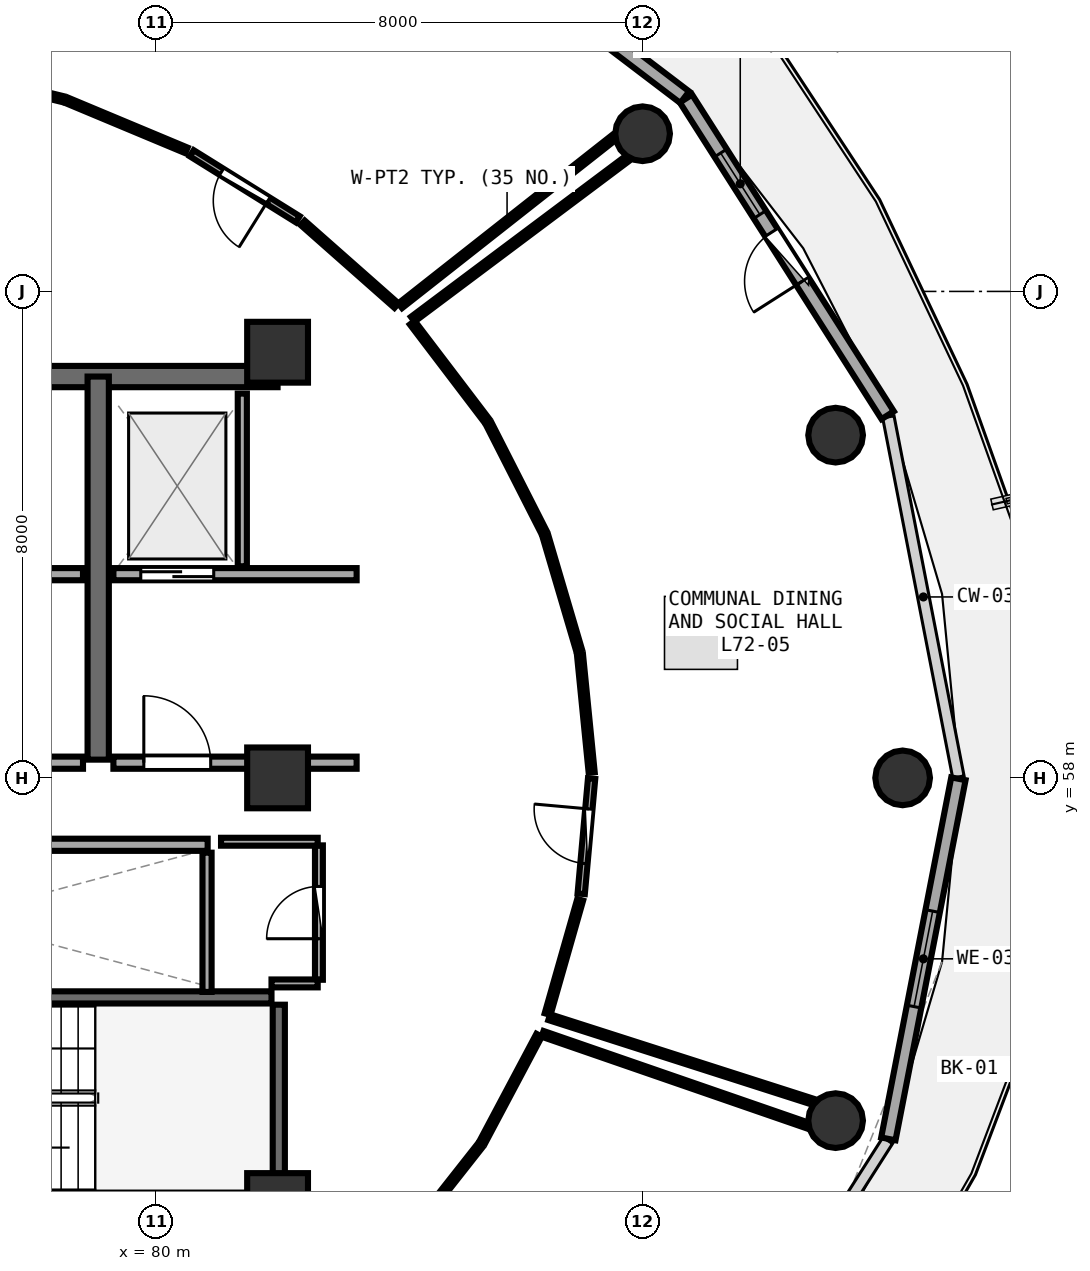
"""IFC4 building model, lengths in metres.
Left out: names, types, materials, properties, quantities, classifications, styles, units other than length and angle.
Written with IfcOpenShell. Run it as: python <this file> out.ifc"""

import sys

from ifc_helpers import new_model, si_unit, direction, frame, frame_2d, origin, origin_2d, place, context, subcontext, project, spatial, rectangle, circle, extrude, element, fill, save


model = new_model("IFC4")
c1 = context("Model", 3, precision=1e-05, world=origin(), true_north=direction((0.0, 1.0)))
c2 = subcontext(c1, "Body", "Model", "MODEL_VIEW")
j1 = project(units=[si_unit("LENGTHUNIT", "METRE"), si_unit("PLANEANGLEUNIT", "RADIAN")], contexts=[c1])
p1 = place(None, origin())
s1 = spatial("IfcSite", under=j1, at=p1, CompositionType="ELEMENT")
p2 = place(p1, origin())
s2 = spatial("IfcBuilding", under=s1, at=p2, CompositionType="ELEMENT")
p3 = place(p2, frame((0.0, 0.0, 282.45)))
s3 = spatial("IfcBuildingStorey", under=s2, at=p3, CompositionType="ELEMENT", Elevation=282.45)
for number, where, z_axis, x_axis in (
    (1, (82.0, 51.0, 0.0), (0.0, 0.0, 1.0), (1.0, 0.0, 0.0)),
    (2, (82.0, 58.0, 0.0), (0.0, 0.0, 1.0), (1.0, 0.0, 0.0)),
    (3, (82.0, 65.0, 0.0), (0.0, 0.0, 1.0), (1.0, 0.0, 0.0)),
):
    element("IfcColumn", number, at=place(p3, frame(where, z_axis=z_axis, x_axis=x_axis)), inside=s3, PredefinedType="PILASTER", context=c2, shape_type="SweptSolid", body=[
        extrude(rectangle(XDim=1.0, YDim=1.0, at=origin_2d()), origin(), (0.0, 0.0, 1.0), 3.75),
    ])
for number, where, z_axis, x_axis in (
    (4, (92.28, 58.0, 0.0), (0.0, 0.0, 1.0), (1.0, 0.0, 0.0)),
    (5, (91.177, 63.636, 0.0), (0.0, 0.0, 1.0), (1.0, 0.0, 0.0)),
    (6, (88.003, 68.593, 0.0), (0.0, 0.0, 1.0), (1.0, 0.0, 0.0)),
    (7, (91.177, 52.364, 0.0), (0.0, 0.0, 1.0), (1.0, 0.0, 0.0)),
):
    element("IfcColumn", number, at=place(p3, frame(where, z_axis=z_axis, x_axis=x_axis)), inside=s3, PredefinedType="COLUMN", context=c2, shape_type="SweptSolid", body=[
        extrude(circle(Radius=0.45, at=origin_2d()), origin(), (0.0, 0.0, 1.0), 3.75),
    ])
p4 = place(p3, frame((92.034, 63.964, 0.0), z_axis=(0.0, 0.0, 1.0), x_axis=(-0.537271968456, 0.843409053728, 0.0)))
e8 = element("IfcWall", 8, at=p4, inside=s3, PredefinedType="SOLIDWALL", context=c2, shape_type="SweptSolid", body=[
    extrude(rectangle(XDim=6.175, YDim=0.24, at=frame_2d((3.087, 0.0))), origin(), (0.0, 0.0, 1.0), 3.475),
])
p5 = place(p4, frame((2.613, 0.0, 0.0)))
e9 = element("IfcOpeningElement", 9, at=p5, cuts=e8, PredefinedType="OPENING", context=c2, shape_type="SweptSolid", body=[
    extrude(rectangle(XDim=0.95, YDim=2.1, at=frame_2d((0.475, 1.05))), frame((0.0, 0.13, 0.0), z_axis=(0.0, -1.0, 0.0), x_axis=(1.0, 0.0, 0.0)), (0.0, 0.0, 1.0), 0.26),
])
p6 = place(p4, frame((3.913, 0.0, 0.85)))
e10 = element("IfcOpeningElement", 10, at=p6, cuts=e8, PredefinedType="OPENING", context=c2, shape_type="SweptSolid", body=[
    extrude(rectangle(XDim=1.2, YDim=1.45, at=frame_2d((0.6, 0.725))), frame((0.0, 0.13, 0.0), z_axis=(0.0, -1.0, 0.0), x_axis=(1.0, 0.0, 0.0)), (0.0, 0.0, 1.0), 0.26),
])
p7 = place(p3, frame((88.696, 69.194, 0.0), z_axis=(0.0, 0.0, 1.0), x_axis=(-0.796010444211, 0.605282886514, 0.0)))
e11 = element("IfcWall", 11, at=p7, inside=s3, PredefinedType="SOLIDWALL", context=c2, shape_type="SweptSolid", body=[
    extrude(rectangle(XDim=6.387, YDim=0.24, at=frame_2d((3.194, 0.0))), origin(), (0.0, 0.0, 1.0), 3.475),
])
p8 = place(p7, frame((2.719, 0.0, 0.0)))
e12 = element("IfcOpeningElement", 12, at=p8, cuts=e11, PredefinedType="OPENING", context=c2, shape_type="SweptSolid", body=[
    extrude(rectangle(XDim=0.95, YDim=2.1, at=frame_2d((0.475, 1.05))), frame((0.0, 0.13, 0.0), z_axis=(0.0, -1.0, 0.0), x_axis=(1.0, 0.0, 0.0)), (0.0, 0.0, 1.0), 0.26),
])
p9 = place(p7, frame((4.019, 0.0, 0.85)))
e13 = element("IfcOpeningElement", 13, at=p9, cuts=e11, PredefinedType="OPENING", context=c2, shape_type="SweptSolid", body=[
    extrude(rectangle(XDim=1.2, YDim=1.45, at=frame_2d((0.6, 0.725))), frame((0.0, 0.13, 0.0), z_axis=(0.0, -1.0, 0.0), x_axis=(1.0, 0.0, 0.0)), (0.0, 0.0, 1.0), 0.26),
])
p10 = place(p3, frame((92.045, 52.063, 0.0), z_axis=(0.0, 0.0, 1.0), x_axis=(0.190969309115, 0.981596008028, 0.0)))
e14 = element("IfcWall", 14, at=p10, inside=s3, PredefinedType="SOLIDWALL", context=c2, shape_type="SweptSolid", body=[
    extrude(rectangle(XDim=6.033, YDim=0.24, at=frame_2d((3.017, 0.0))), origin(), (0.0, 0.0, 1.0), 3.475),
])
p11 = place(p10, frame((2.216, 0.0, 0.85)))
e15 = element("IfcOpeningElement", 15, at=p11, cuts=e14, PredefinedType="OPENING", context=c2, shape_type="SweptSolid", body=[
    extrude(rectangle(XDim=1.6, YDim=1.45, at=frame_2d((0.8, 0.725))), frame((0.0, 0.13, 0.0), z_axis=(0.0, -1.0, 0.0), x_axis=(1.0, 0.0, 0.0)), (0.0, 0.0, 1.0), 0.26),
])
p12 = place(p3, frame((82.02, 51.2, 0.0), z_axis=(0.0, 0.0, 1.0), x_axis=(0.0, 1.0, 0.0)))
e16 = element("IfcWall", 16, at=p12, inside=s3, PredefinedType="SHEAR", context=c2, shape_type="SweptSolid", body=[
    extrude(rectangle(XDim=3.07, YDim=0.2, at=frame_2d((1.535, 0.0))), origin(), (0.0, 0.0, 1.0), 3.49),
])
p13 = place(p3, frame((81.9, 54.39, 0.0), z_axis=(0.0, 0.0, 1.0), x_axis=(-1.0, 0.0, 0.0)))
e17 = element("IfcWall", 17, at=p13, inside=s3, PredefinedType="SHEAR", context=c2, shape_type="SweptSolid", body=[
    extrude(rectangle(XDim=8.46, YDim=0.2, at=frame_2d((4.23, 0.0))), origin(), (0.0, 0.0, 1.0), 3.49),
])
p14 = place(p3, frame((74.0, 64.6, 0.0), z_axis=(0.0, 0.0, 1.0), x_axis=(1.0, 0.0, 0.0)))
e18 = element("IfcWall", 18, at=p14, inside=s3, PredefinedType="SHEAR", context=c2, shape_type="SweptSolid", body=[
    extrude(rectangle(XDim=8.0, YDim=0.35, at=frame_2d((4.0, 0.0))), origin(), (0.0, 0.0, 1.0), 3.49),
])
p15 = place(p3, frame((79.05, 58.3, 0.0), z_axis=(0.0, 0.0, 1.0), x_axis=(0.0, 1.0, 0.0)))
e19 = element("IfcWall", 19, at=p15, inside=s3, PredefinedType="SHEAR", context=c2, shape_type="SweptSolid", body=[
    extrude(rectangle(XDim=6.3, YDim=0.35, at=frame_2d((3.15, 0.0))), origin(), (0.0, 0.0, 1.0), 3.49),
])
p16 = place(p3, frame((74.2, 61.35, 0.0), z_axis=(0.0, 0.0, 1.0), x_axis=(1.0, 0.0, 0.0)))
e20 = element("IfcWall", 20, at=p16, inside=s3, PredefinedType="SOLIDWALL", context=c2, shape_type="SweptSolid", body=[
    extrude(rectangle(XDim=4.6, YDim=0.2, at=frame_2d((2.3, 0.0))), origin(), (0.0, 0.0, 1.0), 3.48),
])
p17 = place(p16, frame((0.52, 0.0, 0.0)))
e21 = element("IfcOpeningElement", 21, at=p17, cuts=e20, PredefinedType="OPENING", context=c2, shape_type="SweptSolid", body=[
    extrude(rectangle(XDim=1.2, YDim=2.15, at=frame_2d((0.6, 1.075))), frame((0.0, 0.11, 0.0), z_axis=(0.0, -1.0, 0.0), x_axis=(1.0, 0.0, 0.0)), (0.0, 0.0, 1.0), 0.22),
])
p18 = place(p3, frame((79.3, 61.35, 0.0), z_axis=(0.0, 0.0, 1.0), x_axis=(1.0, 0.0, 0.0)))
e22 = element("IfcWall", 22, at=p18, inside=s3, PredefinedType="SOLIDWALL", context=c2, shape_type="SweptSolid", body=[
    extrude(rectangle(XDim=4.0, YDim=0.2, at=frame_2d((2.0, 0.0))), origin(), (0.0, 0.0, 1.0), 2.775),
])
p19 = place(p18, frame((0.45, 0.0, 0.0)))
e23 = element("IfcOpeningElement", 23, at=p19, cuts=e22, PredefinedType="OPENING", context=c2, shape_type="SweptSolid", body=[
    extrude(rectangle(XDim=1.2, YDim=2.15, at=frame_2d((0.6, 1.075))), frame((0.0, 0.11, 0.0), z_axis=(0.0, -1.0, 0.0), x_axis=(1.0, 0.0, 0.0)), (0.0, 0.0, 1.0), 0.22),
])
p20 = place(p3, frame((81.42, 61.48, 0.0), z_axis=(0.0, 0.0, 1.0), x_axis=(0.0, 1.0, 0.0)))
e24 = element("IfcWall", 24, at=p20, inside=s3, PredefinedType="PARTITIONING", context=c2, shape_type="SweptSolid", body=[
    extrude(rectangle(XDim=2.84, YDim=0.15, at=frame_2d((1.42, 0.0))), origin(), (0.0, 0.0, 1.0), 3.48),
])
p21 = place(p3, frame((74.2, 58.25, 0.0), z_axis=(0.0, 0.0, 1.0), x_axis=(1.0, 0.0, 0.0)))
e25 = element("IfcWall", 25, at=p21, inside=s3, PredefinedType="SOLIDWALL", context=c2, shape_type="SweptSolid", body=[
    extrude(rectangle(XDim=4.6, YDim=0.2, at=frame_2d((2.3, 0.0))), origin(), (0.0, 0.0, 1.0), 3.48),
])
p22 = place(p21, frame((1.8, 0.0, 0.0)))
e26 = element("IfcOpeningElement", 26, at=p22, cuts=e25, PredefinedType="OPENING", context=c2, shape_type="SweptSolid", body=[
    extrude(rectangle(XDim=1.1, YDim=2.1, at=frame_2d((0.55, 1.05))), frame((0.0, 0.11, 0.0), z_axis=(0.0, -1.0, 0.0), x_axis=(1.0, 0.0, 0.0)), (0.0, 0.0, 1.0), 0.22),
])
p23 = place(p3, frame((79.3, 58.25, 0.0), z_axis=(0.0, 0.0, 1.0), x_axis=(1.0, 0.0, 0.0)))
e27 = element("IfcWall", 27, at=p23, inside=s3, PredefinedType="SOLIDWALL", context=c2, shape_type="SweptSolid", body=[
    extrude(rectangle(XDim=4.0, YDim=0.2, at=frame_2d((2.0, 0.0))), origin(), (0.0, 0.0, 1.0), 2.775),
])
p24 = place(p23, frame((0.5, 0.0, 0.0)))
e28 = element("IfcOpeningElement", 28, at=p24, cuts=e27, PredefinedType="OPENING", context=c2, shape_type="SweptSolid", body=[
    extrude(rectangle(XDim=1.1, YDim=2.1, at=frame_2d((0.55, 1.05))), frame((0.0, 0.11, 0.0), z_axis=(0.0, -1.0, 0.0), x_axis=(1.0, 0.0, 0.0)), (0.0, 0.0, 1.0), 0.22),
])
p25 = place(p3, frame((72.45, 56.9, 0.0), z_axis=(0.0, 0.0, 1.0), x_axis=(1.0, 0.0, 0.0)))
e29 = element("IfcWall", 29, at=p25, inside=s3, PredefinedType="SOLIDWALL", context=c2, shape_type="SweptSolid", body=[
    extrude(rectangle(XDim=8.4, YDim=0.2, at=frame_2d((4.2, 0.0))), origin(), (0.0, 0.0, 1.0), 3.48),
])
p26 = place(p25, frame((0.4, 0.0, 0.0)))
e30 = element("IfcOpeningElement", 30, at=p26, cuts=e29, PredefinedType="OPENING", context=c2, shape_type="SweptSolid", body=[
    extrude(rectangle(XDim=1.1, YDim=2.1, at=frame_2d((0.55, 1.05))), frame((0.0, 0.11, 0.0), z_axis=(0.0, -1.0, 0.0), x_axis=(1.0, 0.0, 0.0)), (0.0, 0.0, 1.0), 0.22),
])
p27 = place(p25, frame((2.4, 0.0, 0.0)))
e31 = element("IfcOpeningElement", 31, at=p27, cuts=e29, PredefinedType="OPENING", context=c2, shape_type="SweptSolid", body=[
    extrude(rectangle(XDim=1.1, YDim=2.1, at=frame_2d((0.55, 1.05))), frame((0.0, 0.11, 0.0), z_axis=(0.0, -1.0, 0.0), x_axis=(1.0, 0.0, 0.0)), (0.0, 0.0, 1.0), 0.22),
])
p28 = place(p3, frame((80.84, 54.48, 0.0), z_axis=(0.0, 0.0, 1.0), x_axis=(0.0, 1.0, 0.0)))
e32 = element("IfcWall", 32, at=p28, inside=s3, PredefinedType="PARTITIONING", context=c2, shape_type="SweptSolid", body=[
    extrude(rectangle(XDim=2.29, YDim=0.15, at=frame_2d((1.145, 0.0))), origin(), (0.0, 0.0, 1.0), 3.48),
])
p29 = place(p3, frame((82.68, 54.68, 0.0), z_axis=(0.0, 0.0, 1.0), x_axis=(0.0, 1.0, 0.0)))
e33 = element("IfcWall", 33, at=p29, inside=s3, PredefinedType="PLUMBINGWALL", context=c2, shape_type="SweptSolid", body=[
    extrude(rectangle(XDim=2.21, YDim=0.13, at=frame_2d((1.105, 0.0))), origin(), (0.0, 0.0, 1.0), 3.48),
])
p30 = place(p29, frame((0.675, 0.0, 0.0)))
e34 = element("IfcOpeningElement", 34, at=p30, cuts=e33, PredefinedType="OPENING", context=c2, shape_type="SweptSolid", body=[
    extrude(rectangle(XDim=0.86, YDim=2.05, at=frame_2d((0.43, 1.025))), frame((0.0, 0.075, 0.0), z_axis=(0.0, -1.0, 0.0), x_axis=(1.0, 0.0, 0.0)), (0.0, 0.0, 1.0), 0.15),
])
p31 = place(p3, frame((86.993, 56.094, 0.0), z_axis=(0.0, 0.0, 1.0), x_axis=(0.089968706127, 0.995944592795, 0.0)))
e35 = element("IfcWall", 35, at=p31, inside=s3, PredefinedType="PARTITIONING", context=c2, shape_type="SweptSolid", body=[
    extrude(rectangle(XDim=1.902, YDim=0.12, at=frame_2d((0.951, 0.0))), origin(), (0.0, 0.0, 1.0), 3.075),
])
p32 = place(p31, frame((0.501, 0.0, 0.0)))
e36 = element("IfcOpeningElement", 36, at=p32, cuts=e35, PredefinedType="OPENING", context=c2, shape_type="SweptSolid", body=[
    extrude(rectangle(XDim=0.9, YDim=2.08, at=frame_2d((0.45, 1.04))), frame((0.0, 0.07, 0.0), z_axis=(0.0, -1.0, 0.0), x_axis=(1.0, 0.0, 0.0)), (0.0, 0.0, 1.0), 0.14),
])
p33 = place(p3, frame((82.332, 67.187, 0.0), z_axis=(0.0, 0.0, 1.0), x_axis=(-0.848878791214, 0.528587549823, 0.0)))
e37 = element("IfcWall", 37, at=p33, inside=s3, PredefinedType="PARTITIONING", context=c2, shape_type="SweptSolid", body=[
    extrude(rectangle(XDim=2.053, YDim=0.12, at=frame_2d((1.027, 0.0))), origin(), (0.0, 0.0, 1.0), 3.075),
])
p34 = place(p33, frame((0.577, 0.0, 0.0)))
e38 = element("IfcOpeningElement", 38, at=p34, cuts=e37, PredefinedType="OPENING", context=c2, shape_type="SweptSolid", body=[
    extrude(rectangle(XDim=0.9, YDim=2.08, at=frame_2d((0.45, 1.04))), frame((0.0, 0.07, 0.0), z_axis=(0.0, -1.0, 0.0), x_axis=(1.0, 0.0, 0.0)), (0.0, 0.0, 1.0), 0.14),
])
p35 = place(p3, frame((81.9, 54.62, 0.0), z_axis=(0.0, 0.0, 1.0), x_axis=(1.0, 0.0, 0.0)))
e39 = element("IfcWall", 39, at=p35, inside=s3, PredefinedType="PLUMBINGWALL", context=c2, shape_type="SweptSolid", body=[
    extrude(rectangle(XDim=0.76, YDim=0.13, at=frame_2d((0.38, 0.0))), origin(), (0.0, 0.0, 1.0), 2.775),
])
p36 = place(p3, frame((82.66, 56.95, 0.0), z_axis=(0.0, 0.0, 1.0), x_axis=(-1.0, 0.0, 0.0)))
e40 = element("IfcWall", 40, at=p36, inside=s3, PredefinedType="PLUMBINGWALL", context=c2, shape_type="SweptSolid", body=[
    extrude(rectangle(XDim=1.59, YDim=0.13, at=frame_2d((0.795, 0.0))), origin(), (0.0, 0.0, 1.0), 2.775),
])
p37 = place(p3, frame((84.079, 50.365, 0.0), z_axis=(0.0, 0.0, 1.0), x_axis=(0.618820199788, 0.785532660259, 0.0)))
e41 = element("IfcWall", 41, at=p37, inside=s3, PredefinedType="PARTITIONING", context=c2, shape_type="SweptSolid", body=[
    extrude(rectangle(XDim=2.018, YDim=0.1, at=frame_2d((1.009, 0.0))), origin(), (0.0, 0.0, 1.0), 3.075),
])
p38 = place(p3, frame((85.371, 52.016, 0.0), z_axis=(0.0, 0.0, 1.0), x_axis=(0.468933294906, 0.883233584579, 0.0)))
e42 = element("IfcWall", 42, at=p38, inside=s3, PredefinedType="PARTITIONING", context=c2, shape_type="SweptSolid", body=[
    extrude(rectangle(XDim=1.984, YDim=0.1, at=frame_2d((0.992, 0.0))), origin(), (0.0, 0.0, 1.0), 3.235),
])
p39 = place(p3, frame((86.358, 53.791, 0.0), z_axis=(0.0, 0.0, 1.0), x_axis=(0.945103281494, -0.326771766388, 0.0)))
e43 = element("IfcWall", 43, at=p39, inside=s3, PredefinedType="PARTITIONING", context=c2, shape_type="SweptSolid", body=[
    extrude(rectangle(XDim=4.604, YDim=0.1, at=frame_2d((2.302, 0.0))), origin(), (0.0, 0.0, 1.0), 3.075),
])
p40 = place(p3, frame((86.441, 54.115, 0.0), z_axis=(0.0, 0.0, 1.0), x_axis=(0.274226302341, 0.961665188673, 0.0)))
e44 = element("IfcWall", 44, at=p40, inside=s3, PredefinedType="PARTITIONING", context=c2, shape_type="SweptSolid", body=[
    extrude(rectangle(XDim=1.955, YDim=0.1, at=frame_2d((0.978, 0.0))), origin(), (0.0, 0.0, 1.0), 3.48),
])
p41 = place(p3, frame((87.166, 58.088, 0.0), z_axis=(0.0, 0.0, 1.0), x_axis=(-0.098769631998, 0.995110325439, 0.0)))
e45 = element("IfcWall", 45, at=p41, inside=s3, PredefinedType="PARTITIONING", context=c2, shape_type="SweptSolid", body=[
    extrude(rectangle(XDim=1.943, YDim=0.1, at=frame_2d((0.971, 0.0))), origin(), (0.0, 0.0, 1.0), 3.075),
])
p42 = place(p3, frame((86.959, 60.099, 0.0), z_axis=(0.0, 0.0, 1.0), x_axis=(-0.28293653612, 0.959138632591, 0.0)))
e46 = element("IfcWall", 46, at=p42, inside=s3, PredefinedType="PARTITIONING", context=c2, shape_type="SweptSolid", body=[
    extrude(rectangle(XDim=1.956, YDim=0.1, at=frame_2d((0.978, 0.0))), origin(), (0.0, 0.0, 1.0), 3.48),
])
p43 = place(p3, frame((86.376, 62.05, 0.0), z_axis=(0.0, 0.0, 1.0), x_axis=(-0.453658133306, 0.891175795276, 0.0)))
e47 = element("IfcWall", 47, at=p43, inside=s3, PredefinedType="PARTITIONING", context=c2, shape_type="SweptSolid", body=[
    extrude(rectangle(XDim=1.981, YDim=0.1, at=frame_2d((0.991, 0.0))), origin(), (0.0, 0.0, 1.0), 3.235),
])
p44 = place(p3, frame((85.435, 63.883, 0.0), z_axis=(0.0, 0.0, 1.0), x_axis=(-0.605473441765, 0.795865510823, 0.0)))
e48 = element("IfcWall", 48, at=p44, inside=s3, PredefinedType="PARTITIONING", context=c2, shape_type="SweptSolid", body=[
    extrude(rectangle(XDim=2.014, YDim=0.1, at=frame_2d((1.007, 0.0))), origin(), (0.0, 0.0, 1.0), 3.075),
])
p45 = place(p3, frame((84.223, 65.542, 0.0), z_axis=(0.0, 0.0, 1.0), x_axis=(0.800384816546, 0.599486568191, 0.0)))
e49 = element("IfcWall", 49, at=p45, inside=s3, PredefinedType="PARTITIONING", context=c2, shape_type="SweptSolid", body=[
    extrude(rectangle(XDim=4.414, YDim=0.1, at=frame_2d((2.207, 0.0))), origin(), (0.0, 0.0, 1.0), 3.175),
])
p46 = place(p3, frame((90.816, 52.671, 0.0), z_axis=(0.0, 0.0, 1.0), x_axis=(-0.95227750557, 0.305233602976, 0.0)))
e50 = element("IfcWall", 50, at=p46, inside=s3, PredefinedType="PARTITIONING", context=c2, shape_type="SweptSolid", body=[
    extrude(rectangle(XDim=4.565, YDim=0.1, at=frame_2d((2.283, 0.0))), origin(), (0.0, 0.0, 1.0), 3.175),
])
p47 = place(p3, frame((83.955, 65.767, 0.0), z_axis=(0.0, 0.0, 1.0), x_axis=(-0.749539941976, 0.661959119117, 0.0)))
e51 = element("IfcWall", 51, at=p47, inside=s3, PredefinedType="PARTITIONING", context=c2, shape_type="SweptSolid", body=[
    extrude(rectangle(XDim=2.057, YDim=0.1, at=frame_2d((1.029, 0.0))), origin(), (0.0, 0.0, 1.0), 3.075),
])
p48 = place(p3, frame((80.501, 68.319, 0.0), z_axis=(0.0, 0.0, 1.0), x_axis=(-0.922644563927, 0.385651408213, 0.0)))
e52 = element("IfcWall", 52, at=p48, inside=s3, PredefinedType="PARTITIONING", context=c2, shape_type="SweptSolid", body=[
    extrude(rectangle(XDim=2.125, YDim=0.1, at=frame_2d((1.062, 0.0))), origin(), (0.0, 0.0, 1.0), 3.48),
])
p49 = place(p3, frame((78.465, 69.164, 0.0), z_axis=(0.0, 0.0, 1.0), x_axis=(-0.971628772742, 0.236511158257, 0.0)))
e53 = element("IfcWall", 53, at=p49, inside=s3, PredefinedType="PARTITIONING", context=c2, shape_type="SweptSolid", body=[
    extrude(rectangle(XDim=2.147, YDim=0.1, at=frame_2d((1.074, 0.0))), origin(), (0.0, 0.0, 1.0), 3.48),
])
p50 = place(p3, frame((87.532, 68.532, 0.0), z_axis=(0.0, 0.0, 1.0), x_axis=(-0.785736749878, -0.618561039745, 0.0)))
e54 = element("IfcWall", 54, at=p50, inside=s3, PredefinedType="PARTITIONING", context=c2, shape_type="SweptSolid", body=[
    extrude(rectangle(XDim=4.475, YDim=0.1, at=frame_2d((2.237, 0.0))), origin(), (0.0, 0.0, 1.0), 3.075),
])
p51 = place(p5, frame((0.95, 0.0, 0.0), z_axis=(0.0, 0.0, 1.0), x_axis=(-1.0, 0.0, 0.0)))
e55 = element("IfcDoor", 55, at=p51, inside=s3, OperationType="SINGLE_SWING_RIGHT", PredefinedType="DOOR", context=c2, shape_type="SweptSolid", body=[
    extrude(rectangle(XDim=0.95, YDim=2.1, at=frame_2d((0.475, 1.05))), frame((0.0, 0.025, 0.0), z_axis=(0.0, -1.0, 0.0), x_axis=(1.0, 0.0, 0.0)), (0.0, 0.0, 1.0), 0.05),
])
fill(e9, e55)
p52 = place(p6, origin())
e56 = element("IfcWindow", 56, at=p52, inside=s3, PartitioningType="SINGLE_PANEL", PredefinedType="WINDOW", context=c2, shape_type="SweptSolid", body=[
    extrude(rectangle(XDim=1.2, YDim=1.45, at=frame_2d((0.6, 0.725))), frame((0.0, 0.03, 0.0), z_axis=(0.0, -1.0, 0.0), x_axis=(1.0, 0.0, 0.0)), (0.0, 0.0, 1.0), 0.06),
])
fill(e10, e56)
p53 = place(p11, origin())
e57 = element("IfcWindow", 57, at=p53, inside=s3, PartitioningType="SINGLE_PANEL", PredefinedType="WINDOW", context=c2, shape_type="SweptSolid", body=[
    extrude(rectangle(XDim=1.6, YDim=1.45, at=frame_2d((0.8, 0.725))), frame((0.0, 0.03, 0.0), z_axis=(0.0, -1.0, 0.0), x_axis=(1.0, 0.0, 0.0)), (0.0, 0.0, 1.0), 0.06),
])
fill(e15, e57)
p54 = place(p19, origin())
e58 = element("IfcDoor", 58, at=p54, inside=s3, OperationType="DOUBLE_DOOR_SLIDING", PredefinedType="DOOR", context=c2, shape_type="SweptSolid", body=[
    extrude(rectangle(XDim=1.2, YDim=2.15, at=frame_2d((0.6, 1.075))), frame((0.0, 0.025, 0.0), z_axis=(0.0, -1.0, 0.0), x_axis=(1.0, 0.0, 0.0)), (0.0, 0.0, 1.0), 0.05),
])
fill(e23, e58)
p55 = place(p24, frame((1.1, 0.0, 0.0), z_axis=(0.0, 0.0, 1.0), x_axis=(-1.0, 0.0, 0.0)))
e59 = element("IfcDoor", 59, at=p55, inside=s3, OperationType="SINGLE_SWING_RIGHT", PredefinedType="DOOR", context=c2, shape_type="SweptSolid", body=[
    extrude(rectangle(XDim=1.1, YDim=2.1, at=frame_2d((0.55, 1.05))), frame((0.0, 0.025, 0.0), z_axis=(0.0, -1.0, 0.0), x_axis=(1.0, 0.0, 0.0)), (0.0, 0.0, 1.0), 0.05),
])
fill(e28, e59)
p56 = place(p30, origin())
e60 = element("IfcDoor", 60, at=p56, inside=s3, OperationType="SINGLE_SWING_LEFT", PredefinedType="DOOR", context=c2, shape_type="SweptSolid", body=[
    extrude(rectangle(XDim=0.86, YDim=2.05, at=frame_2d((0.43, 1.025))), frame((0.0, 0.025, 0.0), z_axis=(0.0, -1.0, 0.0), x_axis=(1.0, 0.0, 0.0)), (0.0, 0.0, 1.0), 0.05),
])
fill(e34, e60)
p57 = place(p32, origin())
e61 = element("IfcDoor", 61, at=p57, inside=s3, OperationType="SINGLE_SWING_RIGHT", PredefinedType="DOOR", context=c2, shape_type="SweptSolid", body=[
    extrude(rectangle(XDim=0.9, YDim=2.08, at=frame_2d((0.45, 1.04))), frame((0.0, 0.025, 0.0), z_axis=(0.0, -1.0, 0.0), x_axis=(1.0, 0.0, 0.0)), (0.0, 0.0, 1.0), 0.05),
])
fill(e36, e61)
p58 = place(p34, origin())
e62 = element("IfcDoor", 62, at=p58, inside=s3, OperationType="SINGLE_SWING_LEFT", PredefinedType="DOOR", context=c2, shape_type="SweptSolid", body=[
    extrude(rectangle(XDim=0.9, YDim=2.08, at=frame_2d((0.45, 1.04))), frame((0.0, 0.025, 0.0), z_axis=(0.0, -1.0, 0.0), x_axis=(1.0, 0.0, 0.0)), (0.0, 0.0, 1.0), 0.05),
])
fill(e38, e62)
save(model, sys.argv[1])
